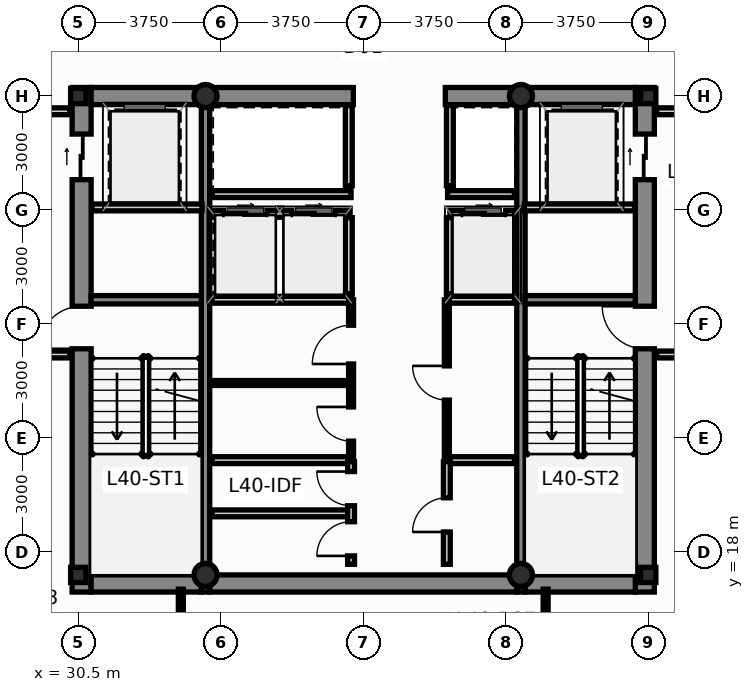
"""IFC4 building model, lengths in metres.
Left out: names, types, materials, properties, quantities, classifications, styles, units other than length and angle.
Written with IfcOpenShell. Run it as: python <this file> out.ifc"""

import sys

from ifc_helpers import new_model, si_unit, direction, frame, frame_2d, origin, origin_2d, place, context, subcontext, project, spatial, rectangle, hollow_circle, i_section, extrude, source, transform, mapped, element, fill, save


model = new_model("IFC4")
c1 = context("Model", 3, precision=1e-05, world=origin(), true_north=direction((0.0, 1.0)))
c2 = subcontext(c1, "Body", "Model", "MODEL_VIEW")
j1 = project(units=[si_unit("LENGTHUNIT", "METRE"), si_unit("PLANEANGLEUNIT", "RADIAN")], contexts=[c1])
p1 = place(None, origin())
s1 = spatial("IfcSite", under=j1, at=p1, CompositionType="ELEMENT")
p2 = place(p1, origin())
s2 = spatial("IfcBuilding", under=s1, at=p2, CompositionType="ELEMENT")
p3 = place(p2, frame((0.0, 0.0, 154.85)))
s3 = spatial("IfcBuildingStorey", under=s2, at=p3, CompositionType="ELEMENT", Elevation=154.85)
m1 = source(origin(), c2, "Body", "SweptSolid", [
    extrude(i_section(OverallWidth=0.4, OverallDepth=0.4, WebThickness=0.02, FlangeThickness=0.032, at=origin_2d()), origin(), (0.0, 0.0, 1.0), 3.65),
])
for number, where, z_axis, x_axis in (
    (1, (30.5, 17.4, 0.0), (0.0, 0.0, 1.0), (1.0, 0.0, 0.0)),
    (2, (45.5, 17.4, 0.0), (0.0, 0.0, 1.0), (1.0, 0.0, 0.0)),
    (3, (45.5, 30.0, 0.0), (0.0, 0.0, 1.0), (1.0, 0.0, 0.0)),
    (4, (30.5, 30.0, 0.0), (0.0, 0.0, 1.0), (1.0, 0.0, 0.0)),
):
    element("IfcColumn", number, at=place(p3, frame(where, z_axis=z_axis, x_axis=x_axis)), inside=s3, PredefinedType="COLUMN", context=c2, shape_type="MappedRepresentation", body=[
        mapped(m1, transform((0.0, 0.0, 0.0), scale=1.0)),
    ])
m2 = source(origin(), c2, "Body", "SweptSolid", [
    extrude(hollow_circle(Radius=0.305, WallThickness=0.025, at=origin_2d()), origin(), (0.0, 0.0, 1.0), 3.65),
])
for number, where, z_axis, x_axis in (
    (5, (33.85, 17.4, 0.0), (0.0, 0.0, 1.0), (1.0, 0.0, 0.0)),
    (6, (42.15, 17.4, 0.0), (0.0, 0.0, 1.0), (1.0, 0.0, 0.0)),
    (7, (33.85, 30.0, 0.0), (0.0, 0.0, 1.0), (1.0, 0.0, 0.0)),
    (8, (42.15, 30.0, 0.0), (0.0, 0.0, 1.0), (1.0, 0.0, 0.0)),
):
    element("IfcColumn", number, at=place(p3, frame(where, z_axis=z_axis, x_axis=x_axis)), inside=s3, PredefinedType="COLUMN", context=c2, shape_type="MappedRepresentation", body=[
        mapped(m2, transform((0.0, 0.0, 0.0), scale=1.0)),
    ])
p4 = place(p3, frame((30.59, 16.95, 0.0), z_axis=(0.0, 0.0, 1.0), x_axis=(0.0, 1.0, 0.0)))
e9 = element("IfcWall", 9, at=p4, inside=s3, PredefinedType="SHEAR", context=c2, shape_type="SweptSolid", body=[
    extrude(rectangle(XDim=13.275, YDim=0.5, at=frame_2d((6.638, 0.0))), origin(), (0.0, 0.0, 1.0), 3.65),
])
p5 = place(p4, frame((6.4, 0.0, 0.0)))
e10 = element("IfcOpeningElement", 10, at=p5, cuts=e9, PredefinedType="OPENING", context=c2, shape_type="SweptSolid", body=[
    extrude(rectangle(XDim=1.12, YDim=2.15, at=frame_2d((0.56, 1.075))), frame((0.0, 0.262, 0.0), z_axis=(0.0, -1.0, 0.0), x_axis=(1.0, 0.0, 0.0)), (0.0, 0.0, 1.0), 0.524),
])
p6 = place(p4, frame((10.85, 0.0, 0.0)))
e11 = element("IfcOpeningElement", 11, at=p6, cuts=e9, PredefinedType="OPENING", context=c2, shape_type="SweptSolid", body=[
    extrude(rectangle(XDim=1.2, YDim=2.2, at=frame_2d((0.6, 1.1))), frame((0.0, 0.262, 0.0), z_axis=(0.0, -1.0, 0.0), x_axis=(1.0, 0.0, 0.0)), (0.0, 0.0, 1.0), 0.524),
])
p7 = place(p3, frame((45.41, 16.95, 0.0), z_axis=(0.0, 0.0, 1.0), x_axis=(0.0, 1.0, 0.0)))
e12 = element("IfcWall", 12, at=p7, inside=s3, PredefinedType="SHEAR", context=c2, shape_type="SweptSolid", body=[
    extrude(rectangle(XDim=13.275, YDim=0.5, at=frame_2d((6.638, 0.0))), origin(), (0.0, 0.0, 1.0), 3.65),
])
p8 = place(p7, frame((6.4, 0.0, 0.0)))
e13 = element("IfcOpeningElement", 13, at=p8, cuts=e12, PredefinedType="OPENING", context=c2, shape_type="SweptSolid", body=[
    extrude(rectangle(XDim=1.12, YDim=2.15, at=frame_2d((0.56, 1.075))), frame((0.0, 0.262, 0.0), z_axis=(0.0, -1.0, 0.0), x_axis=(1.0, 0.0, 0.0)), (0.0, 0.0, 1.0), 0.524),
])
p9 = place(p7, frame((10.85, 0.0, 0.0)))
e14 = element("IfcOpeningElement", 14, at=p9, cuts=e12, PredefinedType="OPENING", context=c2, shape_type="SweptSolid", body=[
    extrude(rectangle(XDim=1.2, YDim=2.2, at=frame_2d((0.6, 1.1))), frame((0.0, 0.262, 0.0), z_axis=(0.0, -1.0, 0.0), x_axis=(1.0, 0.0, 0.0)), (0.0, 0.0, 1.0), 0.524),
])
p10 = place(p3, frame((30.84, 17.175, 0.0), z_axis=(0.0, 0.0, 1.0), x_axis=(1.0, 0.0, 0.0)))
e15 = element("IfcWall", 15, at=p10, inside=s3, PredefinedType="SHEAR", context=c2, shape_type="SweptSolid", body=[
    extrude(rectangle(XDim=2.9, YDim=0.45, at=frame_2d((1.45, 0.0))), origin(), (0.0, 0.0, 1.0), 3.65),
])
p11 = place(p3, frame((33.96, 17.175, 0.0), z_axis=(0.0, 0.0, 1.0), x_axis=(1.0, 0.0, 0.0)))
e16 = element("IfcWall", 16, at=p11, inside=s3, PredefinedType="SHEAR", context=c2, shape_type="SweptSolid", body=[
    extrude(rectangle(XDim=8.08, YDim=0.45, at=frame_2d((4.04, 0.0))), origin(), (0.0, 0.0, 1.0), 3.65),
])
for number, where, z_axis, x_axis in (
    (17, (42.26, 17.175, 0.0), (0.0, 0.0, 1.0), (1.0, 0.0, 0.0)),
    (18, (30.84, 30.0, 0.0), (0.0, 0.0, 1.0), (1.0, 0.0, 0.0)),
):
    element("IfcWall", number, at=place(p3, frame(where, z_axis=z_axis, x_axis=x_axis)), inside=s3, PredefinedType="SHEAR", context=c2, shape_type="SweptSolid", body=[
        extrude(rectangle(XDim=2.9, YDim=0.45, at=frame_2d((1.45, 0.0))), origin(), (0.0, 0.0, 1.0), 3.65),
    ])
p12 = place(p3, frame((33.96, 30.0, 0.0), z_axis=(0.0, 0.0, 1.0), x_axis=(1.0, 0.0, 0.0)))
e19 = element("IfcWall", 19, at=p12, inside=s3, PredefinedType="SHEAR", context=c2, shape_type="SweptSolid", body=[
    extrude(rectangle(XDim=3.78, YDim=0.45, at=frame_2d((1.89, 0.0))), origin(), (0.0, 0.0, 1.0), 3.65),
])
p13 = place(p3, frame((40.16, 30.0, 0.0), z_axis=(0.0, 0.0, 1.0), x_axis=(1.0, 0.0, 0.0)))
e20 = element("IfcWall", 20, at=p13, inside=s3, PredefinedType="SHEAR", context=c2, shape_type="SweptSolid", body=[
    extrude(rectangle(XDim=1.88, YDim=0.45, at=frame_2d((0.94, 0.0))), origin(), (0.0, 0.0, 1.0), 3.65),
])
p14 = place(p3, frame((42.26, 30.0, 0.0), z_axis=(0.0, 0.0, 1.0), x_axis=(1.0, 0.0, 0.0)))
e21 = element("IfcWall", 21, at=p14, inside=s3, PredefinedType="SHEAR", context=c2, shape_type="SweptSolid", body=[
    extrude(rectangle(XDim=2.9, YDim=0.45, at=frame_2d((1.45, 0.0))), origin(), (0.0, 0.0, 1.0), 3.65),
])
for number, where, z_axis, x_axis in (
    (22, (33.85, 16.95, 0.0), (0.0, 0.0, 1.0), (0.0, 1.0, 0.0)),
    (23, (42.15, 16.95, 0.0), (0.0, 0.0, 1.0), (0.0, 1.0, 0.0)),
):
    element("IfcWall", number, at=place(p3, frame(where, z_axis=z_axis, x_axis=x_axis)), inside=s3, PredefinedType="SHEAR", context=c2, shape_type="SweptSolid", body=[
        extrude(rectangle(XDim=13.275, YDim=0.22, at=frame_2d((6.638, 0.0))), origin(), (0.0, 0.0, 1.0), 3.65),
    ])
for number, where, z_axis, x_axis in (
    (24, (30.84, 24.64, 0.0), (0.0, 0.0, 1.0), (1.0, 0.0, 0.0)),
    (25, (42.26, 24.64, 0.0), (0.0, 0.0, 1.0), (1.0, 0.0, 0.0)),
):
    element("IfcWall", number, at=place(p3, frame(where, z_axis=z_axis, x_axis=x_axis)), inside=s3, PredefinedType="SHEAR", context=c2, shape_type="SweptSolid", body=[
        extrude(rectangle(XDim=2.9, YDim=0.22, at=frame_2d((1.45, 0.0))), origin(), (0.0, 0.0, 1.0), 3.65),
    ])
p15 = place(p3, frame((34.02, 26.9, 0.0), z_axis=(0.0, 0.0, 1.0), x_axis=(1.0, 0.0, 0.0)))
e26 = element("IfcWall", 26, at=p15, inside=s3, PredefinedType="PARTITIONING", context=c2, shape_type="SweptSolid", body=[
    extrude(rectangle(XDim=3.6, YDim=0.18, at=frame_2d((1.8, 0.0))), origin(), (0.0, 0.0, 1.0), 3.4),
])
p16 = place(p15, frame((0.3, 0.0, 0.0)))
e27 = element("IfcOpeningElement", 27, at=p16, cuts=e26, PredefinedType="OPENING", context=c2, shape_type="SweptSolid", body=[
    extrude(rectangle(XDim=1.15, YDim=2.2, at=frame_2d((0.575, 1.1))), frame((0.0, 0.102, 0.0), z_axis=(0.0, -1.0, 0.0), x_axis=(1.0, 0.0, 0.0)), (0.0, 0.0, 1.0), 0.204),
])
p17 = place(p15, frame((2.1, 0.0, 0.0)))
e28 = element("IfcOpeningElement", 28, at=p17, cuts=e26, PredefinedType="OPENING", context=c2, shape_type="SweptSolid", body=[
    extrude(rectangle(XDim=1.15, YDim=2.2, at=frame_2d((0.575, 1.1))), frame((0.0, 0.102, 0.0), z_axis=(0.0, -1.0, 0.0), x_axis=(1.0, 0.0, 0.0)), (0.0, 0.0, 1.0), 0.204),
])
p18 = place(p3, frame((40.28, 26.9, 0.0), z_axis=(0.0, 0.0, 1.0), x_axis=(1.0, 0.0, 0.0)))
e29 = element("IfcWall", 29, at=p18, inside=s3, PredefinedType="PARTITIONING", context=c2, shape_type="SweptSolid", body=[
    extrude(rectangle(XDim=1.7, YDim=0.18, at=frame_2d((0.85, 0.0))), origin(), (0.0, 0.0, 1.0), 3.4),
])
p19 = place(p18, frame((0.32, 0.0, 0.0)))
e30 = element("IfcOpeningElement", 30, at=p19, cuts=e29, PredefinedType="OPENING", context=c2, shape_type="SweptSolid", body=[
    extrude(rectangle(XDim=1.15, YDim=2.2, at=frame_2d((0.575, 1.1))), frame((0.0, 0.102, 0.0), z_axis=(0.0, -1.0, 0.0), x_axis=(1.0, 0.0, 0.0)), (0.0, 0.0, 1.0), 0.204),
])
for number, where, z_axis, x_axis in (
    (31, (37.62, 24.8, 0.0), (0.0, 0.0, 1.0), (0.0, 1.0, 0.0)),
    (32, (40.28, 24.8, 0.0), (0.0, 0.0, 1.0), (0.0, 1.0, 0.0)),
):
    element("IfcWall", number, at=place(p3, frame(where, z_axis=z_axis, x_axis=x_axis)), inside=s3, PredefinedType="PARTITIONING", context=c2, shape_type="SweptSolid", body=[
        extrude(rectangle(XDim=2.0, YDim=0.18, at=frame_2d((1.0, 0.0))), origin(), (0.0, 0.0, 1.0), 3.4),
    ])
p20 = place(p3, frame((34.02, 24.64, 0.0), z_axis=(0.0, 0.0, 1.0), x_axis=(1.0, 0.0, 0.0)))
e33 = element("IfcWall", 33, at=p20, inside=s3, PredefinedType="PARTITIONING", context=c2, shape_type="SweptSolid", body=[
    extrude(rectangle(XDim=3.68, YDim=0.18, at=frame_2d((1.84, 0.0))), origin(), (0.0, 0.0, 1.0), 3.4),
])
p21 = place(p3, frame((40.2, 24.64, 0.0), z_axis=(0.0, 0.0, 1.0), x_axis=(1.0, 0.0, 0.0)))
e34 = element("IfcWall", 34, at=p21, inside=s3, PredefinedType="PARTITIONING", context=c2, shape_type="SweptSolid", body=[
    extrude(rectangle(XDim=1.78, YDim=0.18, at=frame_2d((0.89, 0.0))), origin(), (0.0, 0.0, 1.0), 3.4),
])
p22 = place(p3, frame((34.02, 27.42, 0.0), z_axis=(0.0, 0.0, 1.0), x_axis=(1.0, 0.0, 0.0)))
e35 = element("IfcWall", 35, at=p22, inside=s3, PredefinedType="PARTITIONING", context=c2, shape_type="SweptSolid", body=[
    extrude(rectangle(XDim=3.66, YDim=0.18, at=frame_2d((1.83, 0.0))), origin(), (0.0, 0.0, 1.0), 3.4),
])
p23 = place(p3, frame((40.22, 27.42, 0.0), z_axis=(0.0, 0.0, 1.0), x_axis=(1.0, 0.0, 0.0)))
e36 = element("IfcWall", 36, at=p23, inside=s3, PredefinedType="PARTITIONING", context=c2, shape_type="SweptSolid", body=[
    extrude(rectangle(XDim=1.76, YDim=0.18, at=frame_2d((0.88, 0.0))), origin(), (0.0, 0.0, 1.0), 3.4),
])
for number, where, z_axis, x_axis in (
    (37, (37.62, 27.64, 0.0), (0.0, 0.0, 1.0), (0.0, 1.0, 0.0)),
    (38, (40.28, 27.64, 0.0), (0.0, 0.0, 1.0), (0.0, 1.0, 0.0)),
):
    element("IfcWall", number, at=place(p3, frame(where, z_axis=z_axis, x_axis=x_axis)), inside=s3, PredefinedType="PARTITIONING", context=c2, shape_type="SweptSolid", body=[
        extrude(rectangle(XDim=2.11, YDim=0.18, at=frame_2d((1.055, 0.0))), origin(), (0.0, 0.0, 1.0), 3.4),
    ])
p24 = place(p3, frame((27.52, 23.2, 0.0), z_axis=(0.0, 0.0, 1.0), x_axis=(1.0, 0.0, 0.0)))
e39 = element("IfcWall", 39, at=p24, inside=s3, PredefinedType="PARTITIONING", context=c2, shape_type="SweptSolid", body=[
    extrude(rectangle(XDim=2.76, YDim=0.18, at=frame_2d((1.38, 0.0))), origin(), (0.0, 0.0, 1.0), 3.4),
])
p25 = place(p3, frame((27.52, 29.6, 0.0), z_axis=(0.0, 0.0, 1.0), x_axis=(1.0, 0.0, 0.0)))
e40 = element("IfcWall", 40, at=p25, inside=s3, PredefinedType="PARTITIONING", context=c2, shape_type="SweptSolid", body=[
    extrude(rectangle(XDim=2.76, YDim=0.18, at=frame_2d((1.38, 0.0))), origin(), (0.0, 0.0, 1.0), 2.925),
])
p26 = place(p3, frame((45.72, 23.2, 0.0), z_axis=(0.0, 0.0, 1.0), x_axis=(1.0, 0.0, 0.0)))
e41 = element("IfcWall", 41, at=p26, inside=s3, PredefinedType="PARTITIONING", context=c2, shape_type="SweptSolid", body=[
    extrude(rectangle(XDim=2.76, YDim=0.18, at=frame_2d((1.38, 0.0))), origin(), (0.0, 0.0, 1.0), 3.4),
])
p27 = place(p3, frame((45.72, 29.6, 0.0), z_axis=(0.0, 0.0, 1.0), x_axis=(1.0, 0.0, 0.0)))
e42 = element("IfcWall", 42, at=p27, inside=s3, PredefinedType="PARTITIONING", context=c2, shape_type="SweptSolid", body=[
    extrude(rectangle(XDim=2.76, YDim=0.18, at=frame_2d((1.38, 0.0))), origin(), (0.0, 0.0, 1.0), 2.925),
])
for number, where, z_axis, x_axis in (
    (43, (30.86, 27.07, 0.0), (0.0, 0.0, 1.0), (1.0, 0.0, 0.0)),
    (44, (42.24, 27.07, 0.0), (0.0, 0.0, 1.0), (1.0, 0.0, 0.0)),
):
    element("IfcWall", number, at=place(p3, frame(where, z_axis=z_axis, x_axis=x_axis)), inside=s3, PredefinedType="PARTITIONING", context=c2, shape_type="SweptSolid", body=[
        extrude(rectangle(XDim=2.9, YDim=0.18, at=frame_2d((1.45, 0.0))), origin(), (0.0, 0.0, 1.0), 3.4),
    ])
p28 = place(p3, frame((34.02, 20.42, 0.0), z_axis=(0.0, 0.0, 1.0), x_axis=(1.0, 0.0, 0.0)))
e45 = element("IfcWall", 45, at=p28, inside=s3, PredefinedType="PARTITIONING", context=c2, shape_type="SweptSolid", body=[
    extrude(rectangle(XDim=3.64, YDim=0.18, at=frame_2d((1.82, 0.0))), origin(), (0.0, 0.0, 1.0), 3.4),
])
p29 = place(p3, frame((40.22, 20.42, 0.0), z_axis=(0.0, 0.0, 1.0), x_axis=(1.0, 0.0, 0.0)))
e46 = element("IfcWall", 46, at=p29, inside=s3, PredefinedType="PARTITIONING", context=c2, shape_type="SweptSolid", body=[
    extrude(rectangle(XDim=1.76, YDim=0.18, at=frame_2d((0.88, 0.0))), origin(), (0.0, 0.0, 1.0), 3.4),
])
p30 = place(p3, frame((34.02, 22.45, 0.0), z_axis=(0.0, 0.0, 1.0), x_axis=(1.0, 0.0, 0.0)))
e47 = element("IfcWall", 47, at=p30, inside=s3, PredefinedType="PARTITIONING", context=c2, shape_type="SweptSolid", body=[
    extrude(rectangle(XDim=3.58, YDim=0.13, at=frame_2d((1.79, 0.0))), origin(), (0.0, 0.0, 1.0), 3.4),
])
p31 = place(p3, frame((37.68, 20.5, 0.0), z_axis=(0.0, 0.0, 1.0), x_axis=(0.0, 1.0, 0.0)))
e48 = element("IfcWall", 48, at=p31, inside=s3, PredefinedType="PARTITIONING", context=c2, shape_type="SweptSolid", body=[
    extrude(rectangle(XDim=4.14, YDim=0.13, at=frame_2d((2.07, 0.0))), origin(), (0.0, 0.0, 1.0), 3.4),
])
p32 = place(p31, frame((0.42, 0.0, 0.0)))
e49 = element("IfcOpeningElement", 49, at=p32, cuts=e48, PredefinedType="OPENING", context=c2, shape_type="SweptSolid", body=[
    extrude(rectangle(XDim=0.9, YDim=2.1, at=frame_2d((0.45, 1.05))), frame((0.0, 0.077, 0.0), z_axis=(0.0, -1.0, 0.0), x_axis=(1.0, 0.0, 0.0)), (0.0, 0.0, 1.0), 0.154),
])
p33 = place(p31, frame((2.45, 0.0, 0.0)))
e50 = element("IfcOpeningElement", 50, at=p33, cuts=e48, PredefinedType="OPENING", context=c2, shape_type="SweptSolid", body=[
    extrude(rectangle(XDim=1.02, YDim=2.15, at=frame_2d((0.51, 1.075))), frame((0.0, 0.077, 0.0), z_axis=(0.0, -1.0, 0.0), x_axis=(1.0, 0.0, 0.0)), (0.0, 0.0, 1.0), 0.154),
])
p34 = place(p3, frame((40.2, 20.5, 0.0), z_axis=(0.0, 0.0, 1.0), x_axis=(0.0, 1.0, 0.0)))
e51 = element("IfcWall", 51, at=p34, inside=s3, PredefinedType="PARTITIONING", context=c2, shape_type="SweptSolid", body=[
    extrude(rectangle(XDim=4.14, YDim=0.13, at=frame_2d((2.07, 0.0))), origin(), (0.0, 0.0, 1.0), 3.4),
])
p35 = place(p34, frame((1.5, 0.0, 0.0)))
e52 = element("IfcOpeningElement", 52, at=p35, cuts=e51, PredefinedType="OPENING", context=c2, shape_type="SweptSolid", body=[
    extrude(rectangle(XDim=0.9, YDim=2.1, at=frame_2d((0.45, 1.05))), frame((0.0, 0.077, 0.0), z_axis=(0.0, -1.0, 0.0), x_axis=(1.0, 0.0, 0.0)), (0.0, 0.0, 1.0), 0.154),
])
p36 = place(p3, frame((34.02, 19.02, 0.0), z_axis=(0.0, 0.0, 1.0), x_axis=(1.0, 0.0, 0.0)))
e53 = element("IfcWall", 53, at=p36, inside=s3, PredefinedType="PARTITIONING", context=c2, shape_type="SweptSolid", body=[
    extrude(rectangle(XDim=3.58, YDim=0.18, at=frame_2d((1.79, 0.0))), origin(), (0.0, 0.0, 1.0), 3.4),
])
p37 = place(p3, frame((37.68, 17.68, 0.0), z_axis=(0.0, 0.0, 1.0), x_axis=(0.0, 1.0, 0.0)))
e54 = element("IfcWall", 54, at=p37, inside=s3, PredefinedType="PARTITIONING", context=c2, shape_type="SweptSolid", body=[
    extrude(rectangle(XDim=2.7, YDim=0.18, at=frame_2d((1.35, 0.0))), origin(), (0.0, 0.0, 1.0), 3.4),
])
p38 = place(p37, frame((0.22, 0.0, 0.0)))
e55 = element("IfcOpeningElement", 55, at=p38, cuts=e54, PredefinedType="OPENING", context=c2, shape_type="SweptSolid", body=[
    extrude(rectangle(XDim=0.9, YDim=2.1, at=frame_2d((0.45, 1.05))), frame((0.0, 0.102, 0.0), z_axis=(0.0, -1.0, 0.0), x_axis=(1.0, 0.0, 0.0)), (0.0, 0.0, 1.0), 0.204),
])
p39 = place(p37, frame((1.54, 0.0, 0.0)))
e56 = element("IfcOpeningElement", 56, at=p39, cuts=e54, PredefinedType="OPENING", context=c2, shape_type="SweptSolid", body=[
    extrude(rectangle(XDim=0.9, YDim=2.1, at=frame_2d((0.45, 1.05))), frame((0.0, 0.102, 0.0), z_axis=(0.0, -1.0, 0.0), x_axis=(1.0, 0.0, 0.0)), (0.0, 0.0, 1.0), 0.204),
])
p40 = place(p3, frame((40.2, 17.68, 0.0), z_axis=(0.0, 0.0, 1.0), x_axis=(0.0, 1.0, 0.0)))
e57 = element("IfcWall", 57, at=p40, inside=s3, PredefinedType="PARTITIONING", context=c2, shape_type="SweptSolid", body=[
    extrude(rectangle(XDim=2.7, YDim=0.18, at=frame_2d((1.35, 0.0))), origin(), (0.0, 0.0, 1.0), 3.4),
])
p41 = place(p40, frame((0.85, 0.0, 0.0)))
e58 = element("IfcOpeningElement", 58, at=p41, cuts=e57, PredefinedType="OPENING", context=c2, shape_type="SweptSolid", body=[
    extrude(rectangle(XDim=0.9, YDim=2.1, at=frame_2d((0.45, 1.05))), frame((0.0, 0.102, 0.0), z_axis=(0.0, -1.0, 0.0), x_axis=(1.0, 0.0, 0.0)), (0.0, 0.0, 1.0), 0.204),
])
for number, where, z_axis, x_axis in (
    (59, (33.2, 15.225, 0.0), (0.0, 0.0, 1.0), (0.0, 1.0, 0.0)),
    (60, (42.8, 15.225, 0.0), (0.0, 0.0, 1.0), (0.0, 1.0, 0.0)),
):
    element("IfcWall", number, at=place(p3, frame(where, z_axis=z_axis, x_axis=x_axis)), inside=s3, PredefinedType="PARTITIONING", context=c2, shape_type="SweptSolid", body=[
        extrude(rectangle(XDim=1.8, YDim=0.13, at=frame_2d((0.9, 0.0))), origin(), (0.0, 0.0, 1.0), 3.4),
    ])
p42 = place(p5, origin())
e61 = element("IfcDoor", 61, at=p42, inside=s3, OperationType="SINGLE_SWING_LEFT", PredefinedType="DOOR", context=c2, shape_type="SweptSolid", body=[
    extrude(rectangle(XDim=1.12, YDim=2.15, at=frame_2d((0.56, 1.075))), frame((0.0, 0.025, 0.0), z_axis=(0.0, -1.0, 0.0), x_axis=(1.0, 0.0, 0.0)), (0.0, 0.0, 1.0), 0.05),
])
fill(e10, e61)
p43 = place(p6, origin())
e62 = element("IfcDoor", 62, at=p43, inside=s3, OperationType="SLIDING_TO_LEFT", PredefinedType="DOOR", context=c2, shape_type="SweptSolid", body=[
    extrude(rectangle(XDim=1.2, YDim=2.2, at=frame_2d((0.6, 1.1))), frame((0.0, 0.025, 0.0), z_axis=(0.0, -1.0, 0.0), x_axis=(1.0, 0.0, 0.0)), (0.0, 0.0, 1.0), 0.05),
])
fill(e11, e62)
p44 = place(p8, origin())
e63 = element("IfcDoor", 63, at=p44, inside=s3, OperationType="SINGLE_SWING_RIGHT", PredefinedType="DOOR", context=c2, shape_type="SweptSolid", body=[
    extrude(rectangle(XDim=1.12, YDim=2.15, at=frame_2d((0.56, 1.075))), frame((0.0, 0.025, 0.0), z_axis=(0.0, -1.0, 0.0), x_axis=(1.0, 0.0, 0.0)), (0.0, 0.0, 1.0), 0.05),
])
fill(e13, e63)
p45 = place(p9, origin())
e64 = element("IfcDoor", 64, at=p45, inside=s3, OperationType="SLIDING_TO_RIGHT", PredefinedType="DOOR", context=c2, shape_type="SweptSolid", body=[
    extrude(rectangle(XDim=1.2, YDim=2.2, at=frame_2d((0.6, 1.1))), frame((0.0, 0.025, 0.0), z_axis=(0.0, -1.0, 0.0), x_axis=(1.0, 0.0, 0.0)), (0.0, 0.0, 1.0), 0.05),
])
fill(e14, e64)
p46 = place(p16, origin())
e65 = element("IfcDoor", 65, at=p46, inside=s3, OperationType="SLIDING_TO_LEFT", PredefinedType="DOOR", context=c2, shape_type="SweptSolid", body=[
    extrude(rectangle(XDim=1.15, YDim=2.2, at=frame_2d((0.575, 1.1))), frame((0.0, 0.025, 0.0), z_axis=(0.0, -1.0, 0.0), x_axis=(1.0, 0.0, 0.0)), (0.0, 0.0, 1.0), 0.05),
])
fill(e27, e65)
p47 = place(p17, origin())
e66 = element("IfcDoor", 66, at=p47, inside=s3, OperationType="SLIDING_TO_RIGHT", PredefinedType="DOOR", context=c2, shape_type="SweptSolid", body=[
    extrude(rectangle(XDim=1.15, YDim=2.2, at=frame_2d((0.575, 1.1))), frame((0.0, 0.025, 0.0), z_axis=(0.0, -1.0, 0.0), x_axis=(1.0, 0.0, 0.0)), (0.0, 0.0, 1.0), 0.05),
])
fill(e28, e66)
p48 = place(p19, origin())
e67 = element("IfcDoor", 67, at=p48, inside=s3, OperationType="SLIDING_TO_LEFT", PredefinedType="DOOR", context=c2, shape_type="SweptSolid", body=[
    extrude(rectangle(XDim=1.15, YDim=2.2, at=frame_2d((0.575, 1.1))), frame((0.0, 0.025, 0.0), z_axis=(0.0, -1.0, 0.0), x_axis=(1.0, 0.0, 0.0)), (0.0, 0.0, 1.0), 0.05),
])
fill(e30, e67)
p49 = place(p32, origin())
e68 = element("IfcDoor", 68, at=p49, inside=s3, OperationType="SINGLE_SWING_RIGHT", PredefinedType="DOOR", context=c2, shape_type="SweptSolid", body=[
    extrude(rectangle(XDim=0.9, YDim=2.1, at=frame_2d((0.45, 1.05))), frame((0.0, 0.025, 0.0), z_axis=(0.0, -1.0, 0.0), x_axis=(1.0, 0.0, 0.0)), (0.0, 0.0, 1.0), 0.05),
])
fill(e49, e68)
p50 = place(p33, origin())
e69 = element("IfcDoor", 69, at=p50, inside=s3, OperationType="SINGLE_SWING_LEFT", PredefinedType="DOOR", context=c2, shape_type="SweptSolid", body=[
    extrude(rectangle(XDim=1.02, YDim=2.15, at=frame_2d((0.51, 1.075))), frame((0.0, 0.025, 0.0), z_axis=(0.0, -1.0, 0.0), x_axis=(1.0, 0.0, 0.0)), (0.0, 0.0, 1.0), 0.05),
])
fill(e50, e69)
p51 = place(p35, origin())
e70 = element("IfcDoor", 70, at=p51, inside=s3, OperationType="SINGLE_SWING_RIGHT", PredefinedType="DOOR", context=c2, shape_type="SweptSolid", body=[
    extrude(rectangle(XDim=0.9, YDim=2.1, at=frame_2d((0.45, 1.05))), frame((0.0, 0.025, 0.0), z_axis=(0.0, -1.0, 0.0), x_axis=(1.0, 0.0, 0.0)), (0.0, 0.0, 1.0), 0.05),
])
fill(e52, e70)
p52 = place(p38, origin())
e71 = element("IfcDoor", 71, at=p52, inside=s3, OperationType="SINGLE_SWING_LEFT", PredefinedType="DOOR", context=c2, shape_type="SweptSolid", body=[
    extrude(rectangle(XDim=0.9, YDim=2.1, at=frame_2d((0.45, 1.05))), frame((0.0, 0.025, 0.0), z_axis=(0.0, -1.0, 0.0), x_axis=(1.0, 0.0, 0.0)), (0.0, 0.0, 1.0), 0.05),
])
fill(e55, e71)
p53 = place(p39, origin())
e72 = element("IfcDoor", 72, at=p53, inside=s3, OperationType="SINGLE_SWING_RIGHT", PredefinedType="DOOR", context=c2, shape_type="SweptSolid", body=[
    extrude(rectangle(XDim=0.9, YDim=2.1, at=frame_2d((0.45, 1.05))), frame((0.0, 0.025, 0.0), z_axis=(0.0, -1.0, 0.0), x_axis=(1.0, 0.0, 0.0)), (0.0, 0.0, 1.0), 0.05),
])
fill(e56, e72)
p54 = place(p41, origin())
e73 = element("IfcDoor", 73, at=p54, inside=s3, OperationType="SINGLE_SWING_LEFT", PredefinedType="DOOR", context=c2, shape_type="SweptSolid", body=[
    extrude(rectangle(XDim=0.9, YDim=2.1, at=frame_2d((0.45, 1.05))), frame((0.0, 0.025, 0.0), z_axis=(0.0, -1.0, 0.0), x_axis=(1.0, 0.0, 0.0)), (0.0, 0.0, 1.0), 0.05),
])
fill(e58, e73)
save(model, sys.argv[1])
